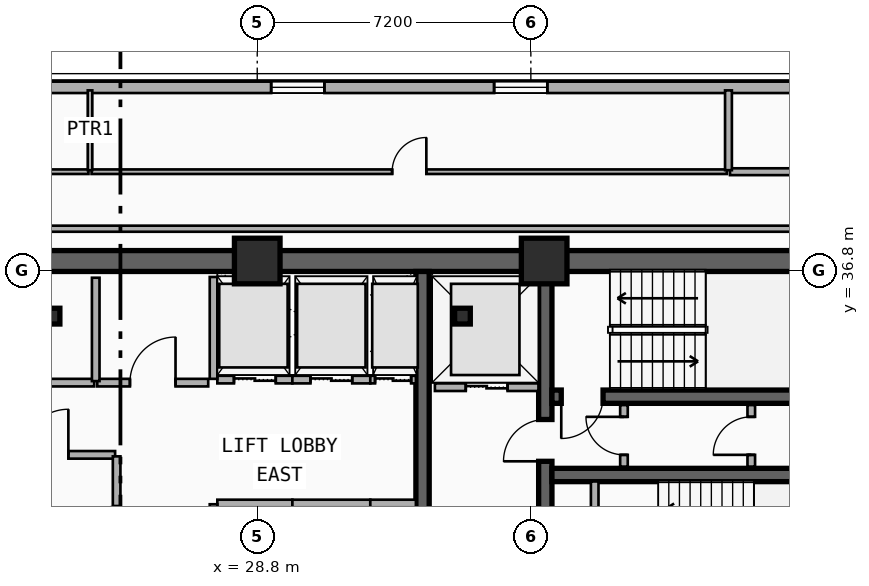
"""IFC4 building model, lengths in metres.
Left out: names, types, materials, properties, quantities, classifications, styles, units other than length and angle.
Written with IfcOpenShell. Run it as: python <this file> out.ifc"""

import sys

from ifc_helpers import new_model, si_unit, direction, frame, frame_2d, origin, origin_2d, place, context, subcontext, project, spatial, rectangle, i_section, extrude, element, fill, save


model = new_model("IFC4")
c1 = context("Model", 3, precision=1e-05, world=origin(), true_north=direction((0.0, 1.0)))
c2 = subcontext(c1, "Body", "Model", "MODEL_VIEW")
j1 = project(units=[si_unit("LENGTHUNIT", "METRE"), si_unit("PLANEANGLEUNIT", "RADIAN")], contexts=[c1])
p1 = place(None, origin())
s1 = spatial("IfcSite", under=j1, at=p1, CompositionType="ELEMENT")
p2 = place(p1, origin())
s2 = spatial("IfcBuilding", under=s1, at=p2, CompositionType="ELEMENT")
p3 = place(p2, frame((0.0, 0.0, 137.7)))
s3 = spatial("IfcBuildingStorey", under=s2, at=p3, CompositionType="ELEMENT", Elevation=137.7)
p4 = place(p3, frame((12.15, 37.05, 0.0), z_axis=(0.0, 0.0, 1.0), x_axis=(1.0, 0.0, 0.0)))
e1 = element("IfcWall", 1, at=p4, inside=s3, PredefinedType="SHEAR", context=c2, shape_type="SweptSolid", body=[
    extrude(rectangle(XDim=33.23, YDim=0.55, at=frame_2d((16.615, 0.0))), origin(), (0.0, 0.0, 1.0), 3.55),
])
p5 = place(p3, frame((33.15, 28.095, 0.0), z_axis=(0.0, 0.0, 1.0), x_axis=(0.0, 1.0, 0.0)))
e2 = element("IfcWall", 2, at=p5, inside=s3, PredefinedType="SHEAR", context=c2, shape_type="SweptSolid", body=[
    extrude(rectangle(XDim=8.68, YDim=0.35, at=frame_2d((4.34, 0.0))), origin(), (0.0, 0.0, 1.0), 3.55),
])
p6 = place(p3, frame((36.38, 28.095, 0.0), z_axis=(0.0, 0.0, 1.0), x_axis=(0.0, 1.0, 0.0)))
e3 = element("IfcWall", 3, at=p6, inside=s3, PredefinedType="SHEAR", context=c2, shape_type="SweptSolid", body=[
    extrude(rectangle(XDim=8.68, YDim=0.35, at=frame_2d((4.34, 0.0))), origin(), (0.0, 0.0, 1.0), 3.55),
])
p7 = place(p6, frame((3.685, 0.0, 0.0)))
e4 = element("IfcOpeningElement", 4, at=p7, cuts=e3, PredefinedType="OPENING", context=c2, shape_type="SweptSolid", body=[
    extrude(rectangle(XDim=1.1, YDim=2.15, at=frame_2d((0.55, 1.075))), frame((0.0, 0.185, 0.0), z_axis=(0.0, -1.0, 0.0), x_axis=(1.0, 0.0, 0.0)), (0.0, 0.0, 1.0), 0.37),
])
p8 = place(p3, frame((45.105, 33.48, 0.0), z_axis=(0.0, 0.0, 1.0), x_axis=(-1.0, 0.0, 0.0)))
e5 = element("IfcWall", 5, at=p8, inside=s3, PredefinedType="SHEAR", context=c2, shape_type="SweptSolid", body=[
    extrude(rectangle(XDim=8.55, YDim=0.35, at=frame_2d((4.275, 0.0))), origin(), (0.0, 0.0, 1.0), 3.55),
])
p9 = place(p8, frame((7.205, 0.0, 0.0)))
e6 = element("IfcOpeningElement", 6, at=p9, cuts=e5, PredefinedType="OPENING", context=c2, shape_type="SweptSolid", body=[
    extrude(rectangle(XDim=1.1, YDim=2.15, at=frame_2d((0.55, 1.075))), frame((0.0, 0.185, 0.0), z_axis=(0.0, -1.0, 0.0), x_axis=(1.0, 0.0, 0.0)), (0.0, 0.0, 1.0), 0.37),
])
p10 = place(p3, frame((36.555, 31.42, 0.0), z_axis=(0.0, 0.0, 1.0), x_axis=(1.0, 0.0, 0.0)))
e7 = element("IfcWall", 7, at=p10, inside=s3, PredefinedType="SHEAR", context=c2, shape_type="SweptSolid", body=[
    extrude(rectangle(XDim=8.55, YDim=0.35, at=frame_2d((4.275, 0.0))), origin(), (0.0, 0.0, 1.0), 3.55),
])
for number, where, z_axis, x_axis in (
    (8, (34.2, 35.6, 0.0), (0.0, 0.0, 1.0), (1.0, 0.0, 0.0)),
    (9, (23.4, 35.6, 0.0), (0.0, 0.0, 1.0), (1.0, 0.0, 0.0)),
):
    element("IfcColumn", number, at=place(p3, frame(where, z_axis=z_axis, x_axis=x_axis)), inside=s3, PredefinedType="COLUMN", context=c2, shape_type="SweptSolid", body=[
        extrude(i_section(OverallWidth=0.413, OverallDepth=0.415, WebThickness=0.03, FlangeThickness=0.047, FilletRadius=0.015, at=origin_2d()), origin(), (0.0, 0.0, 1.0), 3.55),
    ])
for number, where, z_axis, x_axis in (
    (10, (28.8, 37.05, 0.0), (0.0, 0.0, 1.0), (1.0, 0.0, 0.0)),
    (11, (36.35, 37.05, 0.0), (0.0, 0.0, 1.0), (1.0, 0.0, 0.0)),
):
    element("IfcColumn", number, at=place(p3, frame(where, z_axis=z_axis, x_axis=x_axis)), inside=s3, PredefinedType="COLUMN", context=c2, shape_type="SweptSolid", body=[
        extrude(rectangle(XDim=1.2, YDim=1.2, at=origin_2d()), origin(), (0.0, 0.0, 1.0), 3.55),
    ])
p11 = place(p3, frame((9.6, 41.62, 0.0), z_axis=(0.0, 0.0, 1.0), x_axis=(1.0, 0.0, 0.0)))
e12 = element("IfcWall", 12, at=p11, inside=s3, PredefinedType="SOLIDWALL", context=c2, shape_type="SweptSolid", body=[
    extrude(rectangle(XDim=38.4, YDim=0.3, at=frame_2d((19.2, 0.0))), origin(), (0.0, 0.0, 1.0), 3.29),
])
p12 = place(p11, frame((4.113, 0.0, 0.75)))
e13 = element("IfcOpeningElement", 13, at=p12, cuts=e12, PredefinedType="OPENING", context=c2, shape_type="SweptSolid", body=[
    extrude(rectangle(XDim=1.4, YDim=2.1, at=frame_2d((0.7, 1.05))), frame((0.0, 0.16, 0.0), z_axis=(0.0, -1.0, 0.0), x_axis=(1.0, 0.0, 0.0)), (0.0, 0.0, 1.0), 0.32),
])
p13 = place(p11, frame((9.307, 0.0, 0.75)))
e14 = element("IfcOpeningElement", 14, at=p13, cuts=e12, PredefinedType="OPENING", context=c2, shape_type="SweptSolid", body=[
    extrude(rectangle(XDim=1.4, YDim=2.1, at=frame_2d((0.7, 1.05))), frame((0.0, 0.16, 0.0), z_axis=(0.0, -1.0, 0.0), x_axis=(1.0, 0.0, 0.0)), (0.0, 0.0, 1.0), 0.32),
])
p14 = place(p11, frame((19.567, 0.0, 0.75)))
e15 = element("IfcOpeningElement", 15, at=p14, cuts=e12, PredefinedType="OPENING", context=c2, shape_type="SweptSolid", body=[
    extrude(rectangle(XDim=1.4, YDim=2.1, at=frame_2d((0.7, 1.05))), frame((0.0, 0.16, 0.0), z_axis=(0.0, -1.0, 0.0), x_axis=(1.0, 0.0, 0.0)), (0.0, 0.0, 1.0), 0.32),
])
p15 = place(p11, frame((25.433, 0.0, 0.75)))
e16 = element("IfcOpeningElement", 16, at=p15, cuts=e12, PredefinedType="OPENING", context=c2, shape_type="SweptSolid", body=[
    extrude(rectangle(XDim=1.4, YDim=2.1, at=frame_2d((0.7, 1.05))), frame((0.0, 0.16, 0.0), z_axis=(0.0, -1.0, 0.0), x_axis=(1.0, 0.0, 0.0)), (0.0, 0.0, 1.0), 0.32),
])
p16 = place(p3, frame((33.475, 33.73, 0.0), z_axis=(0.0, 0.0, 1.0), x_axis=(1.0, 0.0, 0.0)))
e17 = element("IfcWall", 17, at=p16, inside=s3, PredefinedType="PARTITIONING", context=c2, shape_type="SweptSolid", body=[
    extrude(rectangle(XDim=2.725, YDim=0.2, at=frame_2d((1.362, 0.0))), origin(), (0.0, 0.0, 1.0), 2.36),
])
p17 = place(p16, frame((0.812, 0.0, 0.0)))
e18 = element("IfcOpeningElement", 18, at=p17, cuts=e17, PredefinedType="OPENING", context=c2, shape_type="SweptSolid", body=[
    extrude(rectangle(XDim=1.1, YDim=2.15, at=frame_2d((0.55, 1.075))), frame((0.0, 0.11, 0.0), z_axis=(0.0, -1.0, 0.0), x_axis=(1.0, 0.0, 0.0)), (0.0, 0.0, 1.0), 0.22),
])
p18 = place(p3, frame((27.75, 30.67, 0.0), z_axis=(0.0, 0.0, 1.0), x_axis=(1.0, 0.0, 0.0)))
e19 = element("IfcWall", 19, at=p18, inside=s3, PredefinedType="PARTITIONING", context=c2, shape_type="SweptSolid", body=[
    extrude(rectangle(XDim=1.975, YDim=0.2, at=frame_2d((0.988, 0.0))), origin(), (0.0, 0.0, 1.0), 2.36),
])
p19 = place(p3, frame((27.65, 28.07, 0.0), z_axis=(0.0, 0.0, 1.0), x_axis=(0.0, 1.0, 0.0)))
e20 = element("IfcWall", 20, at=p19, inside=s3, PredefinedType="PARTITIONING", context=c2, shape_type="SweptSolid", body=[
    extrude(rectangle(XDim=2.58, YDim=0.2, at=frame_2d((1.29, 0.0))), origin(), (0.0, 0.0, 1.0), 2.36),
])
p20 = place(p3, frame((29.725, 30.67, 0.0), z_axis=(0.0, 0.0, 1.0), x_axis=(1.0, 0.0, 0.0)))
e21 = element("IfcWall", 21, at=p20, inside=s3, PredefinedType="PARTITIONING", context=c2, shape_type="SweptSolid", body=[
    extrude(rectangle(XDim=2.05, YDim=0.2, at=frame_2d((1.025, 0.0))), origin(), (0.0, 0.0, 1.0), 2.67),
])
p21 = place(p3, frame((31.775, 30.67, 0.0), z_axis=(0.0, 0.0, 1.0), x_axis=(1.0, 0.0, 0.0)))
e22 = element("IfcWall", 22, at=p21, inside=s3, PredefinedType="PARTITIONING", context=c2, shape_type="SweptSolid", body=[
    extrude(rectangle(XDim=1.2, YDim=0.2, at=frame_2d((0.6, 0.0))), origin(), (0.0, 0.0, 1.0), 2.67),
])
p22 = place(p3, frame((27.75, 33.93, 0.0), z_axis=(0.0, 0.0, 1.0), x_axis=(1.0, 0.0, 0.0)))
e23 = element("IfcWall", 23, at=p22, inside=s3, PredefinedType="PARTITIONING", context=c2, shape_type="SweptSolid", body=[
    extrude(rectangle(XDim=1.975, YDim=0.2, at=frame_2d((0.988, 0.0))), origin(), (0.0, 0.0, 1.0), 2.36),
])
p23 = place(p22, frame((0.438, 0.0, 0.0)))
e24 = element("IfcOpeningElement", 24, at=p23, cuts=e23, PredefinedType="OPENING", context=c2, shape_type="SweptSolid", body=[
    extrude(rectangle(XDim=1.1, YDim=2.15, at=frame_2d((0.55, 1.075))), frame((0.0, 0.11, 0.0), z_axis=(0.0, -1.0, 0.0), x_axis=(1.0, 0.0, 0.0)), (0.0, 0.0, 1.0), 0.22),
])
p24 = place(p3, frame((27.65, 33.95, 0.0), z_axis=(0.0, 0.0, 1.0), x_axis=(0.0, 1.0, 0.0)))
e25 = element("IfcWall", 25, at=p24, inside=s3, PredefinedType="PARTITIONING", context=c2, shape_type="SweptSolid", body=[
    extrude(rectangle(XDim=2.68, YDim=0.2, at=frame_2d((1.34, 0.0))), origin(), (0.0, 0.0, 1.0), 2.36),
])
p25 = place(p3, frame((29.725, 33.93, 0.0), z_axis=(0.0, 0.0, 1.0), x_axis=(1.0, 0.0, 0.0)))
e26 = element("IfcWall", 26, at=p25, inside=s3, PredefinedType="PARTITIONING", context=c2, shape_type="SweptSolid", body=[
    extrude(rectangle(XDim=2.05, YDim=0.2, at=frame_2d((1.025, 0.0))), origin(), (0.0, 0.0, 1.0), 3.29),
])
p26 = place(p25, frame((0.475, 0.0, 0.0)))
e27 = element("IfcOpeningElement", 27, at=p26, cuts=e26, PredefinedType="OPENING", context=c2, shape_type="SweptSolid", body=[
    extrude(rectangle(XDim=1.1, YDim=2.15, at=frame_2d((0.55, 1.075))), frame((0.0, 0.11, 0.0), z_axis=(0.0, -1.0, 0.0), x_axis=(1.0, 0.0, 0.0)), (0.0, 0.0, 1.0), 0.22),
])
p27 = place(p3, frame((31.775, 33.93, 0.0), z_axis=(0.0, 0.0, 1.0), x_axis=(1.0, 0.0, 0.0)))
e28 = element("IfcWall", 28, at=p27, inside=s3, PredefinedType="PARTITIONING", context=c2, shape_type="SweptSolid", body=[
    extrude(rectangle(XDim=1.2, YDim=0.2, at=frame_2d((0.6, 0.0))), origin(), (0.0, 0.0, 1.0), 3.29),
])
p28 = place(p27, frame((0.125, 0.0, 0.0)))
e29 = element("IfcOpeningElement", 29, at=p28, cuts=e28, PredefinedType="OPENING", context=c2, shape_type="SweptSolid", body=[
    extrude(rectangle(XDim=0.95, YDim=2.15, at=frame_2d((0.475, 1.075))), frame((0.0, 0.11, 0.0), z_axis=(0.0, -1.0, 0.0), x_axis=(1.0, 0.0, 0.0)), (0.0, 0.0, 1.0), 0.22),
])
p29 = place(p3, frame((37.68, 28.095, 0.0), z_axis=(0.0, 0.0, 1.0), x_axis=(0.0, 1.0, 0.0)))
e30 = element("IfcWall", 30, at=p29, inside=s3, PredefinedType="PARTITIONING", context=c2, shape_type="SweptSolid", body=[
    extrude(rectangle(XDim=3.155, YDim=0.2, at=frame_2d((1.578, 0.0))), origin(), (0.0, 0.0, 1.0), 2.67),
])
p30 = place(p3, frame((38.45, 31.64, 0.0), z_axis=(0.0, 0.0, 1.0), x_axis=(0.0, 1.0, 0.0)))
e31 = element("IfcWall", 31, at=p30, inside=s3, PredefinedType="PARTITIONING", context=c2, shape_type="SweptSolid", body=[
    extrude(rectangle(XDim=1.62, YDim=0.2, at=frame_2d((0.81, 0.0))), origin(), (0.0, 0.0, 1.0), 3.29),
])
p31 = place(p30, frame((0.31, 0.0, 0.0)))
e32 = element("IfcOpeningElement", 32, at=p31, cuts=e31, PredefinedType="OPENING", context=c2, shape_type="SweptSolid", body=[
    extrude(rectangle(XDim=1.0, YDim=2.15, at=frame_2d((0.5, 1.075))), frame((0.0, 0.11, 0.0), z_axis=(0.0, -1.0, 0.0), x_axis=(1.0, 0.0, 0.0)), (0.0, 0.0, 1.0), 0.22),
])
p32 = place(p3, frame((41.8, 31.64, 0.0), z_axis=(0.0, 0.0, 1.0), x_axis=(0.0, 1.0, 0.0)))
e33 = element("IfcWall", 33, at=p32, inside=s3, PredefinedType="PARTITIONING", context=c2, shape_type="SweptSolid", body=[
    extrude(rectangle(XDim=1.62, YDim=0.2, at=frame_2d((0.81, 0.0))), origin(), (0.0, 0.0, 1.0), 3.29),
])
p33 = place(p32, frame((0.31, 0.0, 0.0)))
e34 = element("IfcOpeningElement", 34, at=p33, cuts=e33, PredefinedType="OPENING", context=c2, shape_type="SweptSolid", body=[
    extrude(rectangle(XDim=1.0, YDim=2.15, at=frame_2d((0.5, 1.075))), frame((0.0, 0.11, 0.0), z_axis=(0.0, -1.0, 0.0), x_axis=(1.0, 0.0, 0.0)), (0.0, 0.0, 1.0), 0.22),
])
p34 = place(p3, frame((21.4, 31.95, 0.0), z_axis=(0.0, 0.0, 1.0), x_axis=(1.0, 0.0, 0.0)))
e35 = element("IfcWall", 35, at=p34, inside=s3, PredefinedType="PARTITIONING", context=c2, shape_type="SweptSolid", body=[
    extrude(rectangle(XDim=3.66, YDim=0.2, at=frame_2d((1.83, 0.0))), origin(), (0.0, 0.0, 1.0), 2.36),
])
p35 = place(p34, frame((1.23, 0.0, 0.0)))
e36 = element("IfcOpeningElement", 36, at=p35, cuts=e35, PredefinedType="OPENING", context=c2, shape_type="SweptSolid", body=[
    extrude(rectangle(XDim=1.2, YDim=2.15, at=frame_2d((0.6, 1.075))), frame((0.0, 0.11, 0.0), z_axis=(0.0, -1.0, 0.0), x_axis=(1.0, 0.0, 0.0)), (0.0, 0.0, 1.0), 0.22),
])
p36 = place(p3, frame((21.59, 33.85, 0.0), z_axis=(0.0, 0.0, 1.0), x_axis=(1.0, 0.0, 0.0)))
e37 = element("IfcWall", 37, at=p36, inside=s3, PredefinedType="PARTITIONING", context=c2, shape_type="SweptSolid", body=[
    extrude(rectangle(XDim=2.92, YDim=0.2, at=frame_2d((1.46, 0.0))), origin(), (0.0, 0.0, 1.0), 2.36),
])
p37 = place(p36, frame((0.2, 0.0, 0.0)))
e38 = element("IfcOpeningElement", 38, at=p37, cuts=e37, PredefinedType="OPENING", context=c2, shape_type="SweptSolid", body=[
    extrude(rectangle(XDim=1.2, YDim=2.15, at=frame_2d((0.6, 1.075))), frame((0.0, 0.11, 0.0), z_axis=(0.0, -1.0, 0.0), x_axis=(1.0, 0.0, 0.0)), (0.0, 0.0, 1.0), 0.22),
])
p38 = place(p3, frame((24.59, 33.85, 0.0), z_axis=(0.0, 0.0, 1.0), x_axis=(1.0, 0.0, 0.0)))
e39 = element("IfcWall", 39, at=p38, inside=s3, PredefinedType="PARTITIONING", context=c2, shape_type="SweptSolid", body=[
    extrude(rectangle(XDim=2.92, YDim=0.2, at=frame_2d((1.46, 0.0))), origin(), (0.0, 0.0, 1.0), 3.29),
])
p39 = place(p38, frame((0.86, 0.0, 0.0)))
e40 = element("IfcOpeningElement", 40, at=p39, cuts=e39, PredefinedType="OPENING", context=c2, shape_type="SweptSolid", body=[
    extrude(rectangle(XDim=1.2, YDim=2.15, at=frame_2d((0.6, 1.075))), frame((0.0, 0.11, 0.0), z_axis=(0.0, -1.0, 0.0), x_axis=(1.0, 0.0, 0.0)), (0.0, 0.0, 1.0), 0.22),
])
p40 = place(p3, frame((25.1, 28.09, 0.0), z_axis=(0.0, 0.0, 1.0), x_axis=(0.0, 1.0, 0.0)))
e41 = element("IfcWall", 41, at=p40, inside=s3, PredefinedType="PARTITIONING", context=c2, shape_type="SweptSolid", body=[
    extrude(rectangle(XDim=3.82, YDim=0.2, at=frame_2d((1.91, 0.0))), origin(), (0.0, 0.0, 1.0), 2.67),
])
p41 = place(p40, frame((1.31, 0.0, 0.0)))
e42 = element("IfcOpeningElement", 42, at=p41, cuts=e41, PredefinedType="OPENING", context=c2, shape_type="SweptSolid", body=[
    extrude(rectangle(XDim=1.2, YDim=2.15, at=frame_2d((0.6, 1.075))), frame((0.0, 0.11, 0.0), z_axis=(0.0, -1.0, 0.0), x_axis=(1.0, 0.0, 0.0)), (0.0, 0.0, 1.0), 0.22),
])
p42 = place(p3, frame((24.55, 33.89, 0.0), z_axis=(0.0, 0.0, 1.0), x_axis=(0.0, 1.0, 0.0)))
e43 = element("IfcWall", 43, at=p42, inside=s3, PredefinedType="PARTITIONING", context=c2, shape_type="SweptSolid", body=[
    extrude(rectangle(XDim=2.72, YDim=0.2, at=frame_2d((1.36, 0.0))), origin(), (0.0, 0.0, 1.0), 3.29),
])
p43 = place(p3, frame((5.66, 39.4, 0.0), z_axis=(0.0, 0.0, 1.0), x_axis=(1.0, 0.0, 0.0)))
e44 = element("IfcWall", 44, at=p43, inside=s3, PredefinedType="PARTITIONING", context=c2, shape_type="SweptSolid", body=[
    extrude(rectangle(XDim=18.7, YDim=0.12, at=frame_2d((9.35, 0.0))), origin(), (0.0, 0.0, 1.0), 3.29),
])
p44 = place(p43, frame((8.9, 0.0, 0.0)))
e45 = element("IfcOpeningElement", 45, at=p44, cuts=e44, PredefinedType="OPENING", context=c2, shape_type="SweptSolid", body=[
    extrude(rectangle(XDim=0.9, YDim=2.1, at=frame_2d((0.45, 1.05))), frame((0.0, 0.07, 0.0), z_axis=(0.0, -1.0, 0.0), x_axis=(1.0, 0.0, 0.0)), (0.0, 0.0, 1.0), 0.14),
])
p45 = place(p3, frame((24.44, 39.4, 0.0), z_axis=(0.0, 0.0, 1.0), x_axis=(1.0, 0.0, 0.0)))
e46 = element("IfcWall", 46, at=p45, inside=s3, PredefinedType="PARTITIONING", context=c2, shape_type="SweptSolid", body=[
    extrude(rectangle(XDim=16.72, YDim=0.12, at=frame_2d((8.36, 0.0))), origin(), (0.0, 0.0, 1.0), 3.29),
])
p46 = place(p45, frame((7.91, 0.0, 0.0)))
e47 = element("IfcOpeningElement", 47, at=p46, cuts=e46, PredefinedType="OPENING", context=c2, shape_type="SweptSolid", body=[
    extrude(rectangle(XDim=0.9, YDim=2.1, at=frame_2d((0.45, 1.05))), frame((0.0, 0.07, 0.0), z_axis=(0.0, -1.0, 0.0), x_axis=(1.0, 0.0, 0.0)), (0.0, 0.0, 1.0), 0.14),
])
p47 = place(p3, frame((41.24, 39.4, 0.0), z_axis=(0.0, 0.0, 1.0), x_axis=(1.0, 0.0, 0.0)))
e48 = element("IfcWall", 48, at=p47, inside=s3, PredefinedType="PLUMBINGWALL", context=c2, shape_type="SweptSolid", body=[
    extrude(rectangle(XDim=10.7, YDim=0.18, at=frame_2d((5.35, 0.0))), origin(), (0.0, 0.0, 1.0), 3.29),
])
p48 = place(p47, frame((4.925, 0.0, 0.0)))
e49 = element("IfcOpeningElement", 49, at=p48, cuts=e48, PredefinedType="OPENING", context=c2, shape_type="SweptSolid", body=[
    extrude(rectangle(XDim=0.85, YDim=2.1, at=frame_2d((0.425, 1.05))), frame((0.0, 0.1, 0.0), z_axis=(0.0, -1.0, 0.0), x_axis=(1.0, 0.0, 0.0)), (0.0, 0.0, 1.0), 0.2),
])
p49 = place(p3, frame((24.4, 39.44, 0.0), z_axis=(0.0, 0.0, 1.0), x_axis=(0.0, 1.0, 0.0)))
e50 = element("IfcWall", 50, at=p49, inside=s3, PredefinedType="PARTITIONING", context=c2, shape_type="SweptSolid", body=[
    extrude(rectangle(XDim=2.1, YDim=0.12, at=frame_2d((1.05, 0.0))), origin(), (0.0, 0.0, 1.0), 3.29),
])
p50 = place(p3, frame((41.2, 39.44, 0.0), z_axis=(0.0, 0.0, 1.0), x_axis=(0.0, 1.0, 0.0)))
e51 = element("IfcWall", 51, at=p50, inside=s3, PredefinedType="PLUMBINGWALL", context=c2, shape_type="SweptSolid", body=[
    extrude(rectangle(XDim=2.1, YDim=0.18, at=frame_2d((1.05, 0.0))), origin(), (0.0, 0.0, 1.0), 3.29),
])
p51 = place(p3, frame((11.28, 37.9, 0.0), z_axis=(0.0, 0.0, 1.0), x_axis=(1.0, 0.0, 0.0)))
e52 = element("IfcWall", 52, at=p51, inside=s3, PredefinedType="PARTITIONING", context=c2, shape_type="SweptSolid", body=[
    extrude(rectangle(XDim=35.04, YDim=0.16, at=frame_2d((17.52, 0.0))), origin(), (0.0, 0.0, 1.0), 3.29),
])
p52 = place(p14, origin())
e53 = element("IfcWindow", 53, at=p52, inside=s3, PartitioningType="SINGLE_PANEL", PredefinedType="WINDOW", context=c2, shape_type="SweptSolid", body=[
    extrude(rectangle(XDim=1.4, YDim=2.1, at=frame_2d((0.7, 1.05))), frame((0.0, 0.03, 0.0), z_axis=(0.0, -1.0, 0.0), x_axis=(1.0, 0.0, 0.0)), (0.0, 0.0, 1.0), 0.06),
])
fill(e15, e53)
p53 = place(p15, origin())
e54 = element("IfcWindow", 54, at=p53, inside=s3, PartitioningType="SINGLE_PANEL", PredefinedType="WINDOW", context=c2, shape_type="SweptSolid", body=[
    extrude(rectangle(XDim=1.4, YDim=2.1, at=frame_2d((0.7, 1.05))), frame((0.0, 0.03, 0.0), z_axis=(0.0, -1.0, 0.0), x_axis=(1.0, 0.0, 0.0)), (0.0, 0.0, 1.0), 0.06),
])
fill(e16, e54)
p54 = place(p17, origin())
e55 = element("IfcDoor", 55, at=p54, inside=s3, OperationType="DOUBLE_DOOR_SLIDING", PredefinedType="DOOR", context=c2, shape_type="SweptSolid", body=[
    extrude(rectangle(XDim=1.1, YDim=2.15, at=frame_2d((0.55, 1.075))), frame((0.0, 0.025, 0.0), z_axis=(0.0, -1.0, 0.0), x_axis=(1.0, 0.0, 0.0)), (0.0, 0.0, 1.0), 0.05),
])
fill(e18, e55)
p55 = place(p23, origin())
e56 = element("IfcDoor", 56, at=p55, inside=s3, OperationType="DOUBLE_DOOR_SLIDING", PredefinedType="DOOR", context=c2, shape_type="SweptSolid", body=[
    extrude(rectangle(XDim=1.1, YDim=2.15, at=frame_2d((0.55, 1.075))), frame((0.0, 0.025, 0.0), z_axis=(0.0, -1.0, 0.0), x_axis=(1.0, 0.0, 0.0)), (0.0, 0.0, 1.0), 0.05),
])
fill(e24, e56)
p56 = place(p26, origin())
e57 = element("IfcDoor", 57, at=p56, inside=s3, OperationType="DOUBLE_DOOR_SLIDING", PredefinedType="DOOR", context=c2, shape_type="SweptSolid", body=[
    extrude(rectangle(XDim=1.1, YDim=2.15, at=frame_2d((0.55, 1.075))), frame((0.0, 0.025, 0.0), z_axis=(0.0, -1.0, 0.0), x_axis=(1.0, 0.0, 0.0)), (0.0, 0.0, 1.0), 0.05),
])
fill(e27, e57)
p57 = place(p28, origin())
e58 = element("IfcDoor", 58, at=p57, inside=s3, OperationType="DOUBLE_DOOR_SLIDING", PredefinedType="DOOR", context=c2, shape_type="SweptSolid", body=[
    extrude(rectangle(XDim=0.95, YDim=2.15, at=frame_2d((0.475, 1.075))), frame((0.0, 0.025, 0.0), z_axis=(0.0, -1.0, 0.0), x_axis=(1.0, 0.0, 0.0)), (0.0, 0.0, 1.0), 0.05),
])
fill(e29, e58)
p58 = place(p9, origin())
e59 = element("IfcDoor", 59, at=p58, inside=s3, OperationType="SINGLE_SWING_RIGHT", PredefinedType="DOOR", context=c2, shape_type="SweptSolid", body=[
    extrude(rectangle(XDim=1.1, YDim=2.15, at=frame_2d((0.55, 1.075))), frame((0.0, 0.025, 0.0), z_axis=(0.0, -1.0, 0.0), x_axis=(1.0, 0.0, 0.0)), (0.0, 0.0, 1.0), 0.05),
])
fill(e6, e59)
p59 = place(p7, origin())
e60 = element("IfcDoor", 60, at=p59, inside=s3, OperationType="SINGLE_SWING_LEFT", PredefinedType="DOOR", context=c2, shape_type="SweptSolid", body=[
    extrude(rectangle(XDim=1.1, YDim=2.15, at=frame_2d((0.55, 1.075))), frame((0.0, 0.025, 0.0), z_axis=(0.0, -1.0, 0.0), x_axis=(1.0, 0.0, 0.0)), (0.0, 0.0, 1.0), 0.05),
])
fill(e4, e60)
p60 = place(p31, origin())
e61 = element("IfcDoor", 61, at=p60, inside=s3, OperationType="SINGLE_SWING_RIGHT", PredefinedType="DOOR", context=c2, shape_type="SweptSolid", body=[
    extrude(rectangle(XDim=1.0, YDim=2.15, at=frame_2d((0.5, 1.075))), frame((0.0, 0.025, 0.0), z_axis=(0.0, -1.0, 0.0), x_axis=(1.0, 0.0, 0.0)), (0.0, 0.0, 1.0), 0.05),
])
fill(e32, e61)
p61 = place(p33, origin())
e62 = element("IfcDoor", 62, at=p61, inside=s3, OperationType="SINGLE_SWING_LEFT", PredefinedType="DOOR", context=c2, shape_type="SweptSolid", body=[
    extrude(rectangle(XDim=1.0, YDim=2.15, at=frame_2d((0.5, 1.075))), frame((0.0, 0.025, 0.0), z_axis=(0.0, -1.0, 0.0), x_axis=(1.0, 0.0, 0.0)), (0.0, 0.0, 1.0), 0.05),
])
fill(e34, e62)
p62 = place(p35, origin())
e63 = element("IfcDoor", 63, at=p62, inside=s3, OperationType="SINGLE_SWING_RIGHT", PredefinedType="DOOR", context=c2, shape_type="SweptSolid", body=[
    extrude(rectangle(XDim=1.2, YDim=2.15, at=frame_2d((0.6, 1.075))), frame((0.0, 0.025, 0.0), z_axis=(0.0, -1.0, 0.0), x_axis=(1.0, 0.0, 0.0)), (0.0, 0.0, 1.0), 0.05),
])
fill(e36, e63)
p63 = place(p39, origin())
e64 = element("IfcDoor", 64, at=p63, inside=s3, OperationType="SINGLE_SWING_RIGHT", PredefinedType="DOOR", context=c2, shape_type="SweptSolid", body=[
    extrude(rectangle(XDim=1.2, YDim=2.15, at=frame_2d((0.6, 1.075))), frame((0.0, 0.025, 0.0), z_axis=(0.0, -1.0, 0.0), x_axis=(1.0, 0.0, 0.0)), (0.0, 0.0, 1.0), 0.05),
])
fill(e40, e64)
p64 = place(p41, origin())
e65 = element("IfcDoor", 65, at=p64, inside=s3, OperationType="SINGLE_SWING_LEFT", PredefinedType="DOOR", context=c2, shape_type="SweptSolid", body=[
    extrude(rectangle(XDim=1.2, YDim=2.15, at=frame_2d((0.6, 1.075))), frame((0.0, 0.025, 0.0), z_axis=(0.0, -1.0, 0.0), x_axis=(1.0, 0.0, 0.0)), (0.0, 0.0, 1.0), 0.05),
])
fill(e42, e65)
p65 = place(p46, origin())
e66 = element("IfcDoor", 66, at=p65, inside=s3, OperationType="SINGLE_SWING_RIGHT", PredefinedType="DOOR", context=c2, shape_type="SweptSolid", body=[
    extrude(rectangle(XDim=0.9, YDim=2.1, at=frame_2d((0.45, 1.05))), frame((0.0, 0.025, 0.0), z_axis=(0.0, -1.0, 0.0), x_axis=(1.0, 0.0, 0.0)), (0.0, 0.0, 1.0), 0.05),
])
fill(e47, e66)
save(model, sys.argv[1])
